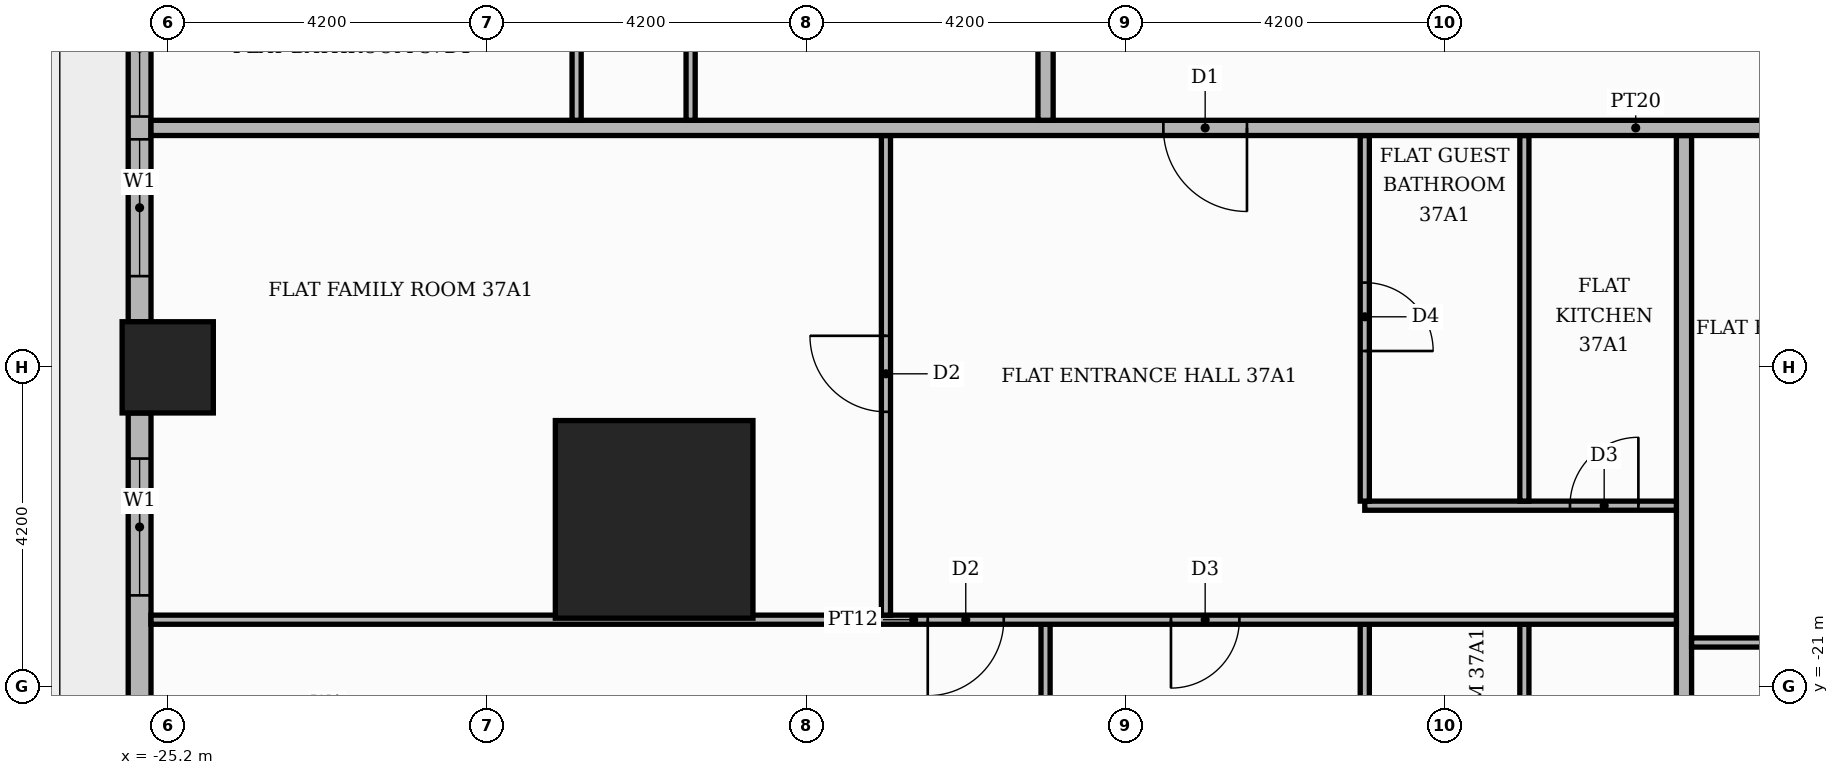
"""IFC4 building model, lengths in metres.
Left out: names, types, materials, properties, quantities, classifications, styles, units other than length and angle.
Written with IfcOpenShell. Run it as: python <this file> out.ifc"""

import sys

from ifc_helpers import new_model, si_unit, direction, frame, frame_2d, origin, origin_2d, place, context, subcontext, project, spatial, rectangle, extrude, element, fill, save


model = new_model("IFC4")
c1 = context("Model", 3, precision=1e-05, world=origin(), true_north=direction((0.0, 1.0)))
c2 = subcontext(c1, "Body", "Model", "MODEL_VIEW")
j1 = project(units=[si_unit("LENGTHUNIT", "METRE"), si_unit("PLANEANGLEUNIT", "RADIAN")], contexts=[c1])
p1 = place(None, origin())
s1 = spatial("IfcSite", under=j1, at=p1, CompositionType="ELEMENT")
p2 = place(p1, origin())
s2 = spatial("IfcBuilding", under=s1, at=p2, CompositionType="ELEMENT")
p3 = place(p2, frame((0.0, 0.0, 157.2)))
s3 = spatial("IfcBuildingStorey", under=s2, at=p3, CompositionType="ELEMENT", Elevation=157.2)
p4 = place(p3, frame((-18.8, -18.8, 0.0), z_axis=(0.0, 0.0, 1.0), x_axis=(1.0, 0.0, 0.0)))
e1 = element("IfcColumn", 1, at=p4, inside=s3, PredefinedType="COLUMN", context=c2, shape_type="SweptSolid", body=[
    extrude(rectangle(XDim=2.6, YDim=2.6, at=origin_2d()), origin(), (0.0, 0.0, 1.0), 3.9),
])
p5 = place(p3, frame((-25.2, -16.8, 0.0), z_axis=(0.0, 0.0, 1.0), x_axis=(1.0, 0.0, 0.0)))
e2 = element("IfcColumn", 2, at=p5, inside=s3, PredefinedType="COLUMN", context=c2, shape_type="SweptSolid", body=[
    extrude(rectangle(XDim=1.2, YDim=1.2, at=origin_2d()), origin(), (0.0, 0.0, 1.0), 3.9),
])
p6 = place(p3, frame((-25.57, -9.0, 0.0), z_axis=(0.0, 0.0, 1.0), x_axis=(0.0, -1.0, 0.0)))
e3 = element("IfcWall", 3, at=p6, inside=s3, PredefinedType="STANDARD", context=c2, shape_type="SweptSolid", body=[
    extrude(rectangle(XDim=7.2, YDim=0.3, at=frame_2d((3.6, 0.0))), origin(), (0.0, 0.0, 1.0), 3.48),
])
p7 = place(p6, frame((0.6, 0.0, 0.9)))
e4 = element("IfcOpeningElement", 4, at=p7, cuts=e3, PredefinedType="OPENING", context=c2, shape_type="SweptSolid", body=[
    extrude(rectangle(XDim=1.8, YDim=2.1, at=frame_2d((0.9, 1.05))), frame((0.0, 0.16, 0.0), z_axis=(0.0, -1.0, 0.0), x_axis=(1.0, 0.0, 0.0)), (0.0, 0.0, 1.0), 0.32),
])
p8 = place(p6, frame((2.7, 0.0, 0.9)))
e5 = element("IfcOpeningElement", 5, at=p8, cuts=e3, PredefinedType="OPENING", context=c2, shape_type="SweptSolid", body=[
    extrude(rectangle(XDim=1.8, YDim=2.1, at=frame_2d((0.9, 1.05))), frame((0.0, 0.16, 0.0), z_axis=(0.0, -1.0, 0.0), x_axis=(1.0, 0.0, 0.0)), (0.0, 0.0, 1.0), 0.32),
])
p9 = place(p6, frame((4.8, 0.0, 0.9)))
e6 = element("IfcOpeningElement", 6, at=p9, cuts=e3, PredefinedType="OPENING", context=c2, shape_type="SweptSolid", body=[
    extrude(rectangle(XDim=1.8, YDim=2.1, at=frame_2d((0.9, 1.05))), frame((0.0, 0.16, 0.0), z_axis=(0.0, -1.0, 0.0), x_axis=(1.0, 0.0, 0.0)), (0.0, 0.0, 1.0), 0.32),
])
p10 = place(p3, frame((-25.57, -17.4, 0.0), z_axis=(0.0, 0.0, 1.0), x_axis=(0.0, -1.0, 0.0)))
e7 = element("IfcWall", 7, at=p10, inside=s3, PredefinedType="STANDARD", context=c2, shape_type="SweptSolid", body=[
    extrude(rectangle(XDim=4.32, YDim=0.3, at=frame_2d((2.16, 0.0))), origin(), (0.0, 0.0, 1.0), 3.48),
])
p11 = place(p10, frame((0.6, 0.0, 0.9)))
e8 = element("IfcOpeningElement", 8, at=p11, cuts=e7, PredefinedType="OPENING", context=c2, shape_type="SweptSolid", body=[
    extrude(rectangle(XDim=1.8, YDim=2.1, at=frame_2d((0.9, 1.05))), frame((0.0, 0.16, 0.0), z_axis=(0.0, -1.0, 0.0), x_axis=(1.0, 0.0, 0.0)), (0.0, 0.0, 1.0), 0.32),
])
p12 = place(p3, frame((-13.65, -25.42, 0.0), z_axis=(0.0, 0.0, 1.0), x_axis=(0.0, 1.0, 0.0)))
e9 = element("IfcWall", 9, at=p12, inside=s3, PredefinedType="PARTITIONING", context=c2, shape_type="SweptSolid", body=[
    extrude(rectangle(XDim=5.24, YDim=0.12, at=frame_2d((2.62, 0.0))), origin(), (0.0, 0.0, 1.0), 3.48),
])
p13 = place(p3, frame((-9.45, -25.42, 0.0), z_axis=(0.0, 0.0, 1.0), x_axis=(0.0, 1.0, 0.0)))
e10 = element("IfcWall", 10, at=p13, inside=s3, PredefinedType="PARTITIONING", context=c2, shape_type="SweptSolid", body=[
    extrude(rectangle(XDim=5.24, YDim=0.12, at=frame_2d((2.62, 0.0))), origin(), (0.0, 0.0, 1.0), 3.48),
])
p14 = place(p13, frame((2.05, 0.0, 0.0)))
e11 = element("IfcOpeningElement", 11, at=p14, cuts=e10, PredefinedType="OPENING", context=c2, shape_type="SweptSolid", body=[
    extrude(rectangle(XDim=0.9, YDim=2.1, at=frame_2d((0.45, 1.05))), frame((0.0, 0.07, 0.0), z_axis=(0.0, -1.0, 0.0), x_axis=(1.0, 0.0, 0.0)), (0.0, 0.0, 1.0), 0.14),
])
p15 = place(p3, frame((-7.35, -25.42, 0.0), z_axis=(0.0, 0.0, 1.0), x_axis=(0.0, 1.0, 0.0)))
e12 = element("IfcWall", 12, at=p15, inside=s3, PredefinedType="PARTITIONING", context=c2, shape_type="SweptSolid", body=[
    extrude(rectangle(XDim=5.24, YDim=0.12, at=frame_2d((2.62, 0.0))), origin(), (0.0, 0.0, 1.0), 3.48),
])
p16 = place(p15, frame((2.05, 0.0, 0.0)))
e13 = element("IfcOpeningElement", 13, at=p16, cuts=e12, PredefinedType="OPENING", context=c2, shape_type="SweptSolid", body=[
    extrude(rectangle(XDim=0.9, YDim=2.1, at=frame_2d((0.45, 1.05))), frame((0.0, 0.07, 0.0), z_axis=(0.0, -1.0, 0.0), x_axis=(1.0, 0.0, 0.0)), (0.0, 0.0, 1.0), 0.14),
])
p17 = place(p3, frame((-5.25, -25.42, 0.0), z_axis=(0.0, 0.0, 1.0), x_axis=(0.0, 1.0, 0.0)))
e14 = element("IfcWall", 14, at=p17, inside=s3, PredefinedType="PARTITIONING", context=c2, shape_type="SweptSolid", body=[
    extrude(rectangle(XDim=11.67, YDim=0.2, at=frame_2d((5.835, 0.0))), origin(), (0.0, 0.0, 1.0), 3.48),
])
p18 = place(p3, frame((-5.15, -20.42, 0.0), z_axis=(0.0, 0.0, 1.0), x_axis=(1.0, 0.0, 0.0)))
e15 = element("IfcWall", 15, at=p18, inside=s3, PredefinedType="PARTITIONING", context=c2, shape_type="SweptSolid", body=[
    extrude(rectangle(XDim=18.7, YDim=0.12, at=frame_2d((9.35, 0.0))), origin(), (0.0, 0.0, 1.0), 3.48),
])
p19 = place(p18, frame((1.5, 0.0, 0.0)))
e16 = element("IfcOpeningElement", 16, at=p19, cuts=e15, PredefinedType="OPENING", context=c2, shape_type="SweptSolid", body=[
    extrude(rectangle(XDim=1.0, YDim=2.1, at=frame_2d((0.5, 1.05))), frame((0.0, 0.07, 0.0), z_axis=(0.0, -1.0, 0.0), x_axis=(1.0, 0.0, 0.0)), (0.0, 0.0, 1.0), 0.14),
])
p20 = place(p18, frame((5.75, 0.0, 0.0)))
e17 = element("IfcOpeningElement", 17, at=p20, cuts=e15, PredefinedType="OPENING", context=c2, shape_type="SweptSolid", body=[
    extrude(rectangle(XDim=0.9, YDim=2.1, at=frame_2d((0.45, 1.05))), frame((0.0, 0.07, 0.0), z_axis=(0.0, -1.0, 0.0), x_axis=(1.0, 0.0, 0.0)), (0.0, 0.0, 1.0), 0.14),
])
p21 = place(p18, frame((14.15, 0.0, 0.0)))
e18 = element("IfcOpeningElement", 18, at=p21, cuts=e15, PredefinedType="OPENING", context=c2, shape_type="SweptSolid", body=[
    extrude(rectangle(XDim=0.9, YDim=2.1, at=frame_2d((0.45, 1.05))), frame((0.0, 0.07, 0.0), z_axis=(0.0, -1.0, 0.0), x_axis=(1.0, 0.0, 0.0)), (0.0, 0.0, 1.0), 0.14),
])
p22 = place(p3, frame((-25.42, -20.12, 0.0), z_axis=(0.0, 0.0, 1.0), x_axis=(1.0, 0.0, 0.0)))
e19 = element("IfcWall", 19, at=p22, inside=s3, PredefinedType="PARTITIONING", context=c2, shape_type="SweptSolid", body=[
    extrude(rectangle(XDim=20.07, YDim=0.12, at=frame_2d((10.035, 0.0))), origin(), (0.0, 0.0, 1.0), 3.48),
])
p23 = place(p22, frame((10.22, 0.0, 0.0)))
e20 = element("IfcOpeningElement", 20, at=p23, cuts=e19, PredefinedType="OPENING", context=c2, shape_type="SweptSolid", body=[
    extrude(rectangle(XDim=1.0, YDim=2.1, at=frame_2d((0.5, 1.05))), frame((0.0, 0.07, 0.0), z_axis=(0.0, -1.0, 0.0), x_axis=(1.0, 0.0, 0.0)), (0.0, 0.0, 1.0), 0.14),
])
p24 = place(p22, frame((13.42, 0.0, 0.0)))
e21 = element("IfcOpeningElement", 21, at=p24, cuts=e19, PredefinedType="OPENING", context=c2, shape_type="SweptSolid", body=[
    extrude(rectangle(XDim=0.9, YDim=2.1, at=frame_2d((0.45, 1.05))), frame((0.0, 0.07, 0.0), z_axis=(0.0, -1.0, 0.0), x_axis=(1.0, 0.0, 0.0)), (0.0, 0.0, 1.0), 0.14),
])
p25 = place(p3, frame((-15.75, -20.06, 0.0), z_axis=(0.0, 0.0, 1.0), x_axis=(0.0, 1.0, 0.0)))
e22 = element("IfcWall", 22, at=p25, inside=s3, PredefinedType="PARTITIONING", context=c2, shape_type="SweptSolid", body=[
    extrude(rectangle(XDim=6.31, YDim=0.12, at=frame_2d((3.155, 0.0))), origin(), (0.0, 0.0, 1.0), 3.48),
])
p26 = place(p25, frame((2.675, 0.0, 0.0)))
e23 = element("IfcOpeningElement", 23, at=p26, cuts=e22, PredefinedType="OPENING", context=c2, shape_type="SweptSolid", body=[
    extrude(rectangle(XDim=1.0, YDim=2.1, at=frame_2d((0.5, 1.05))), frame((0.0, 0.07, 0.0), z_axis=(0.0, -1.0, 0.0), x_axis=(1.0, 0.0, 0.0)), (0.0, 0.0, 1.0), 0.14),
])
p27 = place(p3, frame((-9.45, -18.62, 0.0), z_axis=(0.0, 0.0, 1.0), x_axis=(1.0, 0.0, 0.0)))
e24 = element("IfcWall", 24, at=p27, inside=s3, PredefinedType="PARTITIONING", context=c2, shape_type="SweptSolid", body=[
    extrude(rectangle(XDim=4.1, YDim=0.12, at=frame_2d((2.05, 0.0))), origin(), (0.0, 0.0, 1.0), 3.48),
])
p28 = place(p27, frame((2.7, 0.0, 0.0)))
e25 = element("IfcOpeningElement", 25, at=p28, cuts=e24, PredefinedType="OPENING", context=c2, shape_type="SweptSolid", body=[
    extrude(rectangle(XDim=0.9, YDim=2.1, at=frame_2d((0.45, 1.05))), frame((0.0, 0.07, 0.0), z_axis=(0.0, -1.0, 0.0), x_axis=(1.0, 0.0, 0.0)), (0.0, 0.0, 1.0), 0.14),
])
p29 = place(p3, frame((-9.45, -18.56, 0.0), z_axis=(0.0, 0.0, 1.0), x_axis=(0.0, 1.0, 0.0)))
e26 = element("IfcWall", 26, at=p29, inside=s3, PredefinedType="PARTITIONING", context=c2, shape_type="SweptSolid", body=[
    extrude(rectangle(XDim=4.81, YDim=0.12, at=frame_2d((2.405, 0.0))), origin(), (0.0, 0.0, 1.0), 3.48),
])
p30 = place(p29, frame((1.975, 0.0, 0.0)))
e27 = element("IfcOpeningElement", 27, at=p30, cuts=e26, PredefinedType="OPENING", context=c2, shape_type="SweptSolid", body=[
    extrude(rectangle(XDim=0.9, YDim=2.1, at=frame_2d((0.45, 1.05))), frame((0.0, 0.07, 0.0), z_axis=(0.0, -1.0, 0.0), x_axis=(1.0, 0.0, 0.0)), (0.0, 0.0, 1.0), 0.14),
])
p31 = place(p3, frame((-7.35, -18.56, 0.0), z_axis=(0.0, 0.0, 1.0), x_axis=(0.0, 1.0, 0.0)))
e28 = element("IfcWall", 28, at=p31, inside=s3, PredefinedType="PARTITIONING", context=c2, shape_type="SweptSolid", body=[
    extrude(rectangle(XDim=4.81, YDim=0.12, at=frame_2d((2.405, 0.0))), origin(), (0.0, 0.0, 1.0), 3.48),
])
p32 = place(p3, frame((-25.42, -13.65, 0.0), z_axis=(0.0, 0.0, 1.0), x_axis=(1.0, 0.0, 0.0)))
e29 = element("IfcWall", 29, at=p32, inside=s3, PredefinedType="PARTITIONING", context=c2, shape_type="SweptSolid", body=[
    extrude(rectangle(XDim=39.07, YDim=0.2, at=frame_2d((19.535, 0.0))), origin(), (0.0, 0.0, 1.0), 3.48),
])
p33 = place(p32, frame((13.32, 0.0, 0.0)))
e30 = element("IfcOpeningElement", 30, at=p33, cuts=e29, PredefinedType="OPENING", context=c2, shape_type="SweptSolid", body=[
    extrude(rectangle(XDim=1.1, YDim=2.4, at=frame_2d((0.55, 1.2))), frame((0.0, 0.11, 0.0), z_axis=(0.0, -1.0, 0.0), x_axis=(1.0, 0.0, 0.0)), (0.0, 0.0, 1.0), 0.22),
])
p34 = place(p32, frame((21.72, 0.0, 0.0)))
e31 = element("IfcOpeningElement", 31, at=p34, cuts=e29, PredefinedType="OPENING", context=c2, shape_type="SweptSolid", body=[
    extrude(rectangle(XDim=1.1, YDim=2.4, at=frame_2d((0.55, 1.2))), frame((0.0, 0.11, 0.0), z_axis=(0.0, -1.0, 0.0), x_axis=(1.0, 0.0, 0.0)), (0.0, 0.0, 1.0), 0.22),
])
p35 = place(p3, frame((-19.82, -13.55, 0.0), z_axis=(0.0, 0.0, 1.0), x_axis=(0.0, 1.0, 0.0)))
e32 = element("IfcWall", 32, at=p35, inside=s3, PredefinedType="PARTITIONING", context=c2, shape_type="SweptSolid", body=[
    extrude(rectangle(XDim=1.94, YDim=0.12, at=frame_2d((0.97, 0.0))), origin(), (0.0, 0.0, 1.0), 3.48),
])
p36 = place(p3, frame((-18.32, -13.55, 0.0), z_axis=(0.0, 0.0, 1.0), x_axis=(0.0, 1.0, 0.0)))
e33 = element("IfcWall", 33, at=p36, inside=s3, PredefinedType="PARTITIONING", context=c2, shape_type="SweptSolid", body=[
    extrude(rectangle(XDim=4.04, YDim=0.12, at=frame_2d((2.02, 0.0))), origin(), (0.0, 0.0, 1.0), 3.48),
])
p37 = place(p36, frame((1.55, 0.0, 0.0)))
e34 = element("IfcOpeningElement", 34, at=p37, cuts=e33, PredefinedType="OPENING", context=c2, shape_type="SweptSolid", body=[
    extrude(rectangle(XDim=0.9, YDim=2.1, at=frame_2d((0.45, 1.05))), frame((0.0, 0.07, 0.0), z_axis=(0.0, -1.0, 0.0), x_axis=(1.0, 0.0, 0.0)), (0.0, 0.0, 1.0), 0.14),
])
p38 = place(p3, frame((-13.65, -13.55, 0.0), z_axis=(0.0, 0.0, 1.0), x_axis=(0.0, 1.0, 0.0)))
e35 = element("IfcWall", 35, at=p38, inside=s3, PredefinedType="PARTITIONING", context=c2, shape_type="SweptSolid", body=[
    extrude(rectangle(XDim=2.45, YDim=0.2, at=frame_2d((1.225, 0.0))), origin(), (0.0, 0.0, 1.0), 3.48),
])
p39 = place(p8, origin())
e36 = element("IfcWindow", 36, at=p39, inside=s3, PartitioningType="SINGLE_PANEL", PredefinedType="WINDOW", context=c2, shape_type="SweptSolid", body=[
    extrude(rectangle(XDim=1.8, YDim=2.1, at=frame_2d((0.9, 1.05))), frame((0.0, 0.03, 0.0), z_axis=(0.0, -1.0, 0.0), x_axis=(1.0, 0.0, 0.0)), (0.0, 0.0, 1.0), 0.06),
])
fill(e5, e36)
p40 = place(p9, origin())
e37 = element("IfcWindow", 37, at=p40, inside=s3, PartitioningType="SINGLE_PANEL", PredefinedType="WINDOW", context=c2, shape_type="SweptSolid", body=[
    extrude(rectangle(XDim=1.8, YDim=2.1, at=frame_2d((0.9, 1.05))), frame((0.0, 0.03, 0.0), z_axis=(0.0, -1.0, 0.0), x_axis=(1.0, 0.0, 0.0)), (0.0, 0.0, 1.0), 0.06),
])
fill(e6, e37)
p41 = place(p11, origin())
e38 = element("IfcWindow", 38, at=p41, inside=s3, PartitioningType="SINGLE_PANEL", PredefinedType="WINDOW", context=c2, shape_type="SweptSolid", body=[
    extrude(rectangle(XDim=1.8, YDim=2.1, at=frame_2d((0.9, 1.05))), frame((0.0, 0.03, 0.0), z_axis=(0.0, -1.0, 0.0), x_axis=(1.0, 0.0, 0.0)), (0.0, 0.0, 1.0), 0.06),
])
fill(e8, e38)
p42 = place(p33, frame((1.1, 0.0, 0.0), z_axis=(0.0, 0.0, 1.0), x_axis=(-1.0, 0.0, 0.0)))
e39 = element("IfcDoor", 39, at=p42, inside=s3, OperationType="SINGLE_SWING_RIGHT", PredefinedType="DOOR", context=c2, shape_type="SweptSolid", body=[
    extrude(rectangle(XDim=1.1, YDim=2.4, at=frame_2d((0.55, 1.2))), frame((0.0, 0.025, 0.0), z_axis=(0.0, -1.0, 0.0), x_axis=(1.0, 0.0, 0.0)), (0.0, 0.0, 1.0), 0.05),
])
fill(e30, e39)
p43 = place(p26, origin())
e40 = element("IfcDoor", 40, at=p43, inside=s3, OperationType="SINGLE_SWING_RIGHT", PredefinedType="DOOR", context=c2, shape_type="SweptSolid", body=[
    extrude(rectangle(XDim=1.0, YDim=2.1, at=frame_2d((0.5, 1.05))), frame((0.0, 0.025, 0.0), z_axis=(0.0, -1.0, 0.0), x_axis=(1.0, 0.0, 0.0)), (0.0, 0.0, 1.0), 0.05),
])
fill(e23, e40)
p44 = place(p30, frame((0.9, 0.0, 0.0), z_axis=(0.0, 0.0, 1.0), x_axis=(-1.0, 0.0, 0.0)))
e41 = element("IfcDoor", 41, at=p44, inside=s3, OperationType="SINGLE_SWING_LEFT", PredefinedType="DOOR", context=c2, shape_type="SweptSolid", body=[
    extrude(rectangle(XDim=0.9, YDim=2.1, at=frame_2d((0.45, 1.05))), frame((0.0, 0.025, 0.0), z_axis=(0.0, -1.0, 0.0), x_axis=(1.0, 0.0, 0.0)), (0.0, 0.0, 1.0), 0.05),
])
fill(e27, e41)
p45 = place(p28, origin())
e42 = element("IfcDoor", 42, at=p45, inside=s3, OperationType="SINGLE_SWING_RIGHT", PredefinedType="DOOR", context=c2, shape_type="SweptSolid", body=[
    extrude(rectangle(XDim=0.9, YDim=2.1, at=frame_2d((0.45, 1.05))), frame((0.0, 0.025, 0.0), z_axis=(0.0, -1.0, 0.0), x_axis=(1.0, 0.0, 0.0)), (0.0, 0.0, 1.0), 0.05),
])
fill(e25, e42)
p46 = place(p23, frame((1.0, 0.0, 0.0), z_axis=(0.0, 0.0, 1.0), x_axis=(-1.0, 0.0, 0.0)))
e43 = element("IfcDoor", 43, at=p46, inside=s3, OperationType="SINGLE_SWING_LEFT", PredefinedType="DOOR", context=c2, shape_type="SweptSolid", body=[
    extrude(rectangle(XDim=1.0, YDim=2.1, at=frame_2d((0.5, 1.05))), frame((0.0, 0.025, 0.0), z_axis=(0.0, -1.0, 0.0), x_axis=(1.0, 0.0, 0.0)), (0.0, 0.0, 1.0), 0.05),
])
fill(e20, e43)
p47 = place(p24, frame((0.9, 0.0, 0.0), z_axis=(0.0, 0.0, 1.0), x_axis=(-1.0, 0.0, 0.0)))
e44 = element("IfcDoor", 44, at=p47, inside=s3, OperationType="SINGLE_SWING_LEFT", PredefinedType="DOOR", context=c2, shape_type="SweptSolid", body=[
    extrude(rectangle(XDim=0.9, YDim=2.1, at=frame_2d((0.45, 1.05))), frame((0.0, 0.025, 0.0), z_axis=(0.0, -1.0, 0.0), x_axis=(1.0, 0.0, 0.0)), (0.0, 0.0, 1.0), 0.05),
])
fill(e21, e44)
save(model, sys.argv[1])
